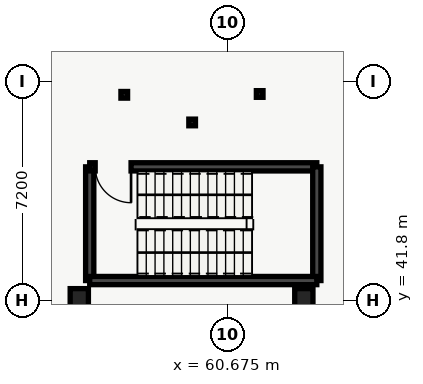
"""IFC4 building model, lengths in metres.
Left out: names, types, materials, properties, quantities, classifications, styles, units other than length and angle.
Written with IfcOpenShell. Run it as: python <this file> out.ifc"""

import sys

from ifc_helpers import new_model, si_unit, direction, frame, frame_2d, origin, origin_2d, place, context, subcontext, project, spatial, rectangle, circle, hollow_circle, extrude, element, fill, save


model = new_model("IFC4")
c1 = context("Model", 3, precision=1e-05, world=origin(), true_north=direction((0.0, 1.0)))
c2 = subcontext(c1, "Body", "Model", "MODEL_VIEW")
j1 = project(units=[si_unit("LENGTHUNIT", "METRE"), si_unit("PLANEANGLEUNIT", "RADIAN")], contexts=[c1])
p1 = place(None, origin())
s1 = spatial("IfcSite", under=j1, at=p1, CompositionType="ELEMENT")
p2 = place(p1, origin())
s2 = spatial("IfcBuilding", under=s1, at=p2, CompositionType="ELEMENT")
p3 = place(p2, frame((0.0, 0.0, -4.8)))
s3 = spatial("IfcBuildingStorey", under=s2, at=p3, CompositionType="ELEMENT", Elevation=-4.8)
for number, where, z_axis, x_axis in (
    (1, (55.807, 41.885, 0.0), (0.0, 0.0, 1.0), (1.0, 0.0, 0.0)),
    (2, (63.193, 41.885, 0.0), (0.0, 0.0, 1.0), (1.0, 0.0, 0.0)),
):
    element("IfcColumn", number, at=place(p3, frame(where, z_axis=z_axis, x_axis=x_axis)), inside=s3, PredefinedType="COLUMN", context=c2, shape_type="SweptSolid", body=[
        extrude(circle(Radius=0.3, at=origin_2d()), origin(), (0.0, 0.0, 1.0), 4.62),
    ])
for number, where, z_axis, x_axis in (
    (3, (57.286, 48.559, 0.0), (0.0, 0.0, 1.0), (1.0, 0.0, 0.0)),
    (4, (59.519, 47.65, 0.0), (0.0, 0.0, 1.0), (1.0, 0.0, 0.0)),
    (5, (61.741, 48.586, 0.0), (0.0, 0.0, 1.0), (1.0, 0.0, 0.0)),
):
    element("IfcColumn", number, at=place(p3, frame(where, z_axis=z_axis, x_axis=x_axis)), inside=s3, PredefinedType="COLUMN", context=c2, shape_type="SweptSolid", body=[
        extrude(hollow_circle(Radius=0.11, WallThickness=0.01, at=origin_2d()), origin(), (0.0, 0.0, 1.0), 4.62),
    ])
p4 = place(p3, frame((56.15, 42.45, 0.0), z_axis=(0.0, 0.0, 1.0), x_axis=(0.0, 1.0, 0.0)))
e6 = element("IfcWall", 6, at=p4, inside=s3, PredefinedType="SHEAR", context=c2, shape_type="SweptSolid", body=[
    extrude(rectangle(XDim=3.74, YDim=0.27, at=frame_2d((1.87, 0.0))), origin(), (0.0, 0.0, 1.0), 4.58),
])
p5 = place(p3, frame((56.15, 46.19, 0.0), z_axis=(0.0, 0.0, 1.0), x_axis=(1.0, 0.0, 0.0)))
e7 = element("IfcWall", 7, at=p5, inside=s3, PredefinedType="SHEAR", context=c2, shape_type="SweptSolid", body=[
    extrude(rectangle(XDim=7.47, YDim=0.27, at=frame_2d((3.735, 0.0))), origin(), (0.0, 0.0, 1.0), 4.58),
])
p6 = place(p5, frame((0.18, 0.0, 0.0)))
e8 = element("IfcOpeningElement", 8, at=p6, cuts=e7, PredefinedType="OPENING", context=c2, shape_type="SweptSolid", body=[
    extrude(rectangle(XDim=1.18, YDim=2.15, at=frame_2d((0.59, 1.075))), frame((0.0, 0.135, 0.0), z_axis=(0.0, -1.0, 0.0), x_axis=(1.0, 0.0, 0.0)), (0.0, 0.0, 1.0), 0.27),
])
p7 = place(p3, frame((63.62, 46.19, 0.0), z_axis=(0.0, 0.0, 1.0), x_axis=(0.0, -1.0, 0.0)))
e9 = element("IfcWall", 9, at=p7, inside=s3, PredefinedType="SHEAR", context=c2, shape_type="SweptSolid", body=[
    extrude(rectangle(XDim=3.74, YDim=0.27, at=frame_2d((1.87, 0.0))), origin(), (0.0, 0.0, 1.0), 4.58),
])
p8 = place(p3, frame((63.62, 42.45, 0.0), z_axis=(0.0, 0.0, 1.0), x_axis=(-1.0, 0.0, 0.0)))
e10 = element("IfcWall", 10, at=p8, inside=s3, PredefinedType="SHEAR", context=c2, shape_type="SweptSolid", body=[
    extrude(rectangle(XDim=7.47, YDim=0.27, at=frame_2d((3.735, 0.0))), origin(), (0.0, 0.0, 1.0), 4.58),
])
p9 = place(p6, origin())
e11 = element("IfcDoor", 11, at=p9, inside=s3, OperationType="SINGLE_SWING_RIGHT", PredefinedType="DOOR", context=c2, shape_type="SweptSolid", body=[
    extrude(rectangle(XDim=1.18, YDim=2.15, at=frame_2d((0.59, 1.075))), frame((0.0, 0.025, 0.0), z_axis=(0.0, -1.0, 0.0), x_axis=(1.0, 0.0, 0.0)), (0.0, 0.0, 1.0), 0.05),
])
fill(e8, e11)
save(model, sys.argv[1])
